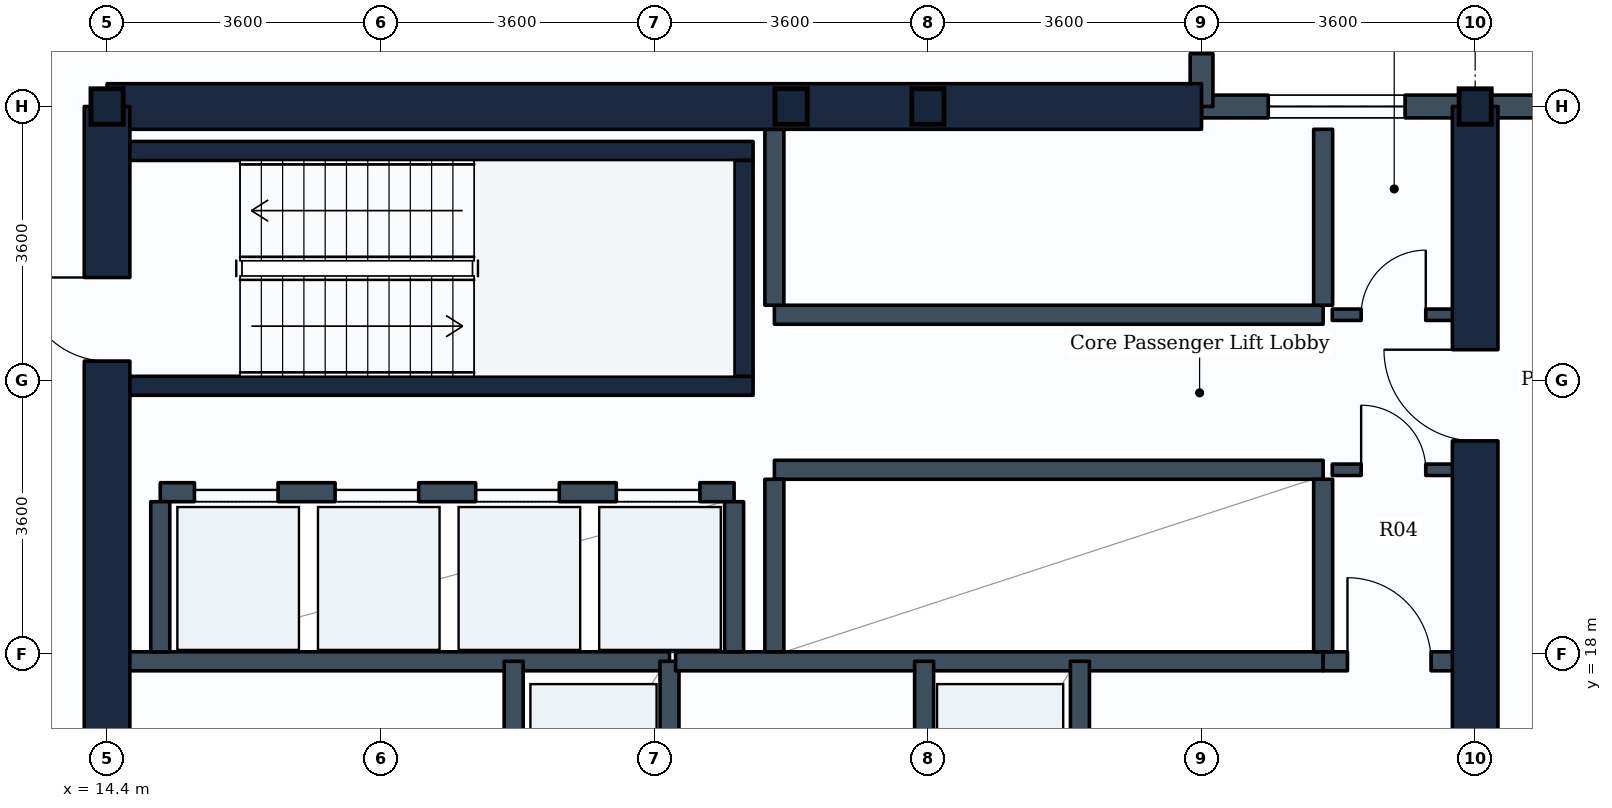
"""IFC4 building model, lengths in metres.
Left out: names, types, materials, properties, quantities, classifications, styles, units other than length and angle.
Written with IfcOpenShell. Run it as: python <this file> out.ifc"""

import sys

from ifc_helpers import new_model, si_unit, direction, frame, frame_2d, origin, origin_2d, place, context, subcontext, project, spatial, rectangle, i_section, extrude, element, fill, save


model = new_model("IFC4")
c1 = context("Model", 3, precision=1e-05, world=origin(), true_north=direction((0.0, 1.0)))
c2 = subcontext(c1, "Body", "Model", "MODEL_VIEW")
j1 = project(units=[si_unit("LENGTHUNIT", "METRE"), si_unit("PLANEANGLEUNIT", "RADIAN")], contexts=[c1])
p1 = place(None, origin())
s1 = spatial("IfcSite", under=j1, at=p1, CompositionType="ELEMENT")
p2 = place(p1, origin())
s2 = spatial("IfcBuilding", under=s1, at=p2, CompositionType="ELEMENT")
p3 = place(p2, frame((0.0, 0.0, 39.6)))
s3 = spatial("IfcBuildingStorey", under=s2, at=p3, CompositionType="ELEMENT", Elevation=39.6)
for number, where, z_axis, x_axis in (
    (1, (14.4, 25.2, 0.0), (0.0, 0.0, 1.0), (1.0, 0.0, 0.0)),
    (2, (23.4, 25.2, 0.0), (0.0, 0.0, 1.0), (1.0, 0.0, 0.0)),
    (3, (25.2, 25.2, 0.0), (0.0, 0.0, 1.0), (1.0, 0.0, 0.0)),
    (4, (32.4, 25.2, 0.0), (0.0, 0.0, 1.0), (1.0, 0.0, 0.0)),
):
    element("IfcColumn", number, at=place(p3, frame(where, z_axis=z_axis, x_axis=x_axis)), inside=s3, PredefinedType="COLUMN", context=c2, shape_type="SweptSolid", body=[
        extrude(i_section(OverallWidth=0.424, OverallDepth=0.467, WebThickness=0.033, FlangeThickness=0.053, FilletRadius=0.015, at=origin_2d()), origin(), (0.0, 0.0, 1.0), 3.9),
    ])
p4 = place(p3, frame((32.4, 25.2, 0.0), z_axis=(0.0, 0.0, 1.0), x_axis=(1.0, 0.0, 0.0)))
e5 = element("IfcWall", 5, at=p4, inside=s3, PredefinedType="STANDARD", context=c2, shape_type="SweptSolid", body=[
    extrude(rectangle(XDim=3.6, YDim=0.3, at=frame_2d((1.8, 0.0))), origin(), (0.0, 0.0, 1.0), 2.93),
])
p5 = place(p3, frame((28.8, 25.2, 0.0), z_axis=(0.0, 0.0, 1.0), x_axis=(1.0, 0.0, 0.0)))
e6 = element("IfcWall", 6, at=p5, inside=s3, PredefinedType="STANDARD", context=c2, shape_type="SweptSolid", body=[
    extrude(rectangle(XDim=3.6, YDim=0.3, at=frame_2d((1.8, 0.0))), origin(), (0.0, 0.0, 1.0), 3.635),
])
p6 = place(p5, frame((0.878, 0.0, 0.85)))
e7 = element("IfcOpeningElement", 7, at=p6, cuts=e6, PredefinedType="OPENING", context=c2, shape_type="SweptSolid", body=[
    extrude(rectangle(XDim=1.8, YDim=1.35, at=frame_2d((0.9, 0.675))), frame((0.0, 0.16, 0.0), z_axis=(0.0, -1.0, 0.0), x_axis=(1.0, 0.0, 0.0)), (0.0, 0.0, 1.0), 0.32),
])
p7 = place(p3, frame((28.8, 25.2, 0.0), z_axis=(0.0, 0.0, 1.0), x_axis=(0.0, 1.0, 0.0)))
e8 = element("IfcWall", 8, at=p7, inside=s3, PredefinedType="STANDARD", context=c2, shape_type="SweptSolid", body=[
    extrude(rectangle(XDim=3.6, YDim=0.3, at=frame_2d((1.8, 0.0))), origin(), (0.0, 0.0, 1.0), 3.14),
])
p8 = place(p7, frame((0.695, 0.0, 0.85)))
e9 = element("IfcOpeningElement", 9, at=p8, cuts=e8, PredefinedType="OPENING", context=c2, shape_type="SweptSolid", body=[
    extrude(rectangle(XDim=1.8, YDim=1.35, at=frame_2d((0.9, 0.675))), frame((0.0, 0.16, 0.0), z_axis=(0.0, -1.0, 0.0), x_axis=(1.0, 0.0, 0.0)), (0.0, 0.0, 1.0), 0.32),
])
p9 = place(p3, frame((14.4, 25.2, 0.0), z_axis=(0.0, 0.0, 1.0), x_axis=(1.0, 0.0, 0.0)))
e10 = element("IfcWall", 10, at=p9, inside=s3, PredefinedType="SHEAR", context=c2, shape_type="SweptSolid", body=[
    extrude(rectangle(XDim=14.4, YDim=0.6, at=frame_2d((7.2, 0.0))), origin(), (0.0, 0.0, 1.0), 3.65),
])
p10 = place(p3, frame((14.4, 10.8, 0.0), z_axis=(0.0, 0.0, 1.0), x_axis=(0.0, 1.0, 0.0)))
e11 = element("IfcWall", 11, at=p10, inside=s3, PredefinedType="SHEAR", context=c2, shape_type="SweptSolid", body=[
    extrude(rectangle(XDim=14.4, YDim=0.6, at=frame_2d((7.2, 0.0))), origin(), (0.0, 0.0, 1.0), 3.65),
])
p11 = place(p10, frame((11.05, 0.0, 0.0)))
e12 = element("IfcOpeningElement", 12, at=p11, cuts=e11, PredefinedType="OPENING", context=c2, shape_type="SweptSolid", body=[
    extrude(rectangle(XDim=1.1, YDim=2.1, at=frame_2d((0.55, 1.05))), frame((0.0, 0.31, 0.0), z_axis=(0.0, -1.0, 0.0), x_axis=(1.0, 0.0, 0.0)), (0.0, 0.0, 1.0), 0.62),
])
p12 = place(p10, frame((4.9, 0.0, 0.0)))
e13 = element("IfcOpeningElement", 13, at=p12, cuts=e11, PredefinedType="OPENING", context=c2, shape_type="SweptSolid", body=[
    extrude(rectangle(XDim=1.2, YDim=2.1, at=frame_2d((0.6, 1.05))), frame((0.0, 0.31, 0.0), z_axis=(0.0, -1.0, 0.0), x_axis=(1.0, 0.0, 0.0)), (0.0, 0.0, 1.0), 0.62),
])
p13 = place(p3, frame((32.4, 10.8, 0.0), z_axis=(0.0, 0.0, 1.0), x_axis=(0.0, 1.0, 0.0)))
e14 = element("IfcWall", 14, at=p13, inside=s3, PredefinedType="SHEAR", context=c2, shape_type="SweptSolid", body=[
    extrude(rectangle(XDim=14.4, YDim=0.6, at=frame_2d((7.2, 0.0))), origin(), (0.0, 0.0, 1.0), 3.65),
])
p14 = place(p13, frame((4.35, 0.0, 0.0)))
e15 = element("IfcOpeningElement", 15, at=p14, cuts=e14, PredefinedType="OPENING", context=c2, shape_type="SweptSolid", body=[
    extrude(rectangle(XDim=1.2, YDim=2.1, at=frame_2d((0.6, 1.05))), frame((0.0, 0.31, 0.0), z_axis=(0.0, -1.0, 0.0), x_axis=(1.0, 0.0, 0.0)), (0.0, 0.0, 1.0), 0.62),
])
p15 = place(p13, frame((10.0, 0.0, 0.0)))
e16 = element("IfcOpeningElement", 16, at=p15, cuts=e14, PredefinedType="OPENING", context=c2, shape_type="SweptSolid", body=[
    extrude(rectangle(XDim=1.2, YDim=2.1, at=frame_2d((0.6, 1.05))), frame((0.0, 0.31, 0.0), z_axis=(0.0, -1.0, 0.0), x_axis=(1.0, 0.0, 0.0)), (0.0, 0.0, 1.0), 0.62),
])
for number, where, z_axis, x_axis in (
    (17, (14.7, 21.525, 0.0), (0.0, 0.0, 1.0), (1.0, 0.0, 0.0)),
    (18, (14.7, 24.615, 0.0), (0.0, 0.0, 1.0), (1.0, 0.0, 0.0)),
):
    element("IfcWall", number, at=place(p3, frame(where, z_axis=z_axis, x_axis=x_axis)), inside=s3, PredefinedType="SHEAR", context=c2, shape_type="SweptSolid", body=[
        extrude(rectangle(XDim=8.2, YDim=0.25, at=frame_2d((4.1, 0.0))), origin(), (0.0, 0.0, 1.0), 3.65),
    ])
p16 = place(p3, frame((22.775, 21.65, 0.0), z_axis=(0.0, 0.0, 1.0), x_axis=(0.0, 1.0, 0.0)))
e19 = element("IfcWall", 19, at=p16, inside=s3, PredefinedType="SHEAR", context=c2, shape_type="SweptSolid", body=[
    extrude(rectangle(XDim=2.84, YDim=0.25, at=frame_2d((1.42, 0.0))), origin(), (0.0, 0.0, 1.0), 3.65),
])
p17 = place(p3, frame((14.65, 17.9, 0.0), z_axis=(0.0, 0.0, 1.0), x_axis=(1.0, 0.0, 0.0)))
e20 = element("IfcWall", 20, at=p17, inside=s3, PredefinedType="PARTITIONING", context=c2, shape_type="SweptSolid", body=[
    extrude(rectangle(XDim=7.15, YDim=0.25, at=frame_2d((3.575, 0.0))), origin(), (0.0, 0.0, 1.0), 3.635),
])
p18 = place(p3, frame((19.75, 14.84, 0.0), z_axis=(0.0, 0.0, 1.0), x_axis=(0.0, 1.0, 0.0)))
e21 = element("IfcWall", 21, at=p18, inside=s3, PredefinedType="PARTITIONING", context=c2, shape_type="SweptSolid", body=[
    extrude(rectangle(XDim=3.06, YDim=0.25, at=frame_2d((1.53, 0.0))), origin(), (0.0, 0.0, 1.0), 3.635),
])
p19 = place(p18, frame((0.98, 0.0, 0.0)))
e22 = element("IfcOpeningElement", 22, at=p19, cuts=e21, PredefinedType="OPENING", context=c2, shape_type="SweptSolid", body=[
    extrude(rectangle(XDim=1.1, YDim=2.1, at=frame_2d((0.55, 1.05))), frame((0.0, 0.135, 0.0), z_axis=(0.0, -1.0, 0.0), x_axis=(1.0, 0.0, 0.0)), (0.0, 0.0, 1.0), 0.27),
])
p20 = place(p3, frame((21.8, 14.84, 0.0), z_axis=(0.0, 0.0, 1.0), x_axis=(0.0, 1.0, 0.0)))
e23 = element("IfcWall", 23, at=p20, inside=s3, PredefinedType="PARTITIONING", context=c2, shape_type="SweptSolid", body=[
    extrude(rectangle(XDim=3.06, YDim=0.25, at=frame_2d((1.53, 0.0))), origin(), (0.0, 0.0, 1.0), 3.635),
])
p21 = place(p3, frame((21.88, 17.9, 0.0), z_axis=(0.0, 0.0, 1.0), x_axis=(1.0, 0.0, 0.0)))
e24 = element("IfcWall", 24, at=p21, inside=s3, PredefinedType="PARTITIONING", context=c2, shape_type="SweptSolid", body=[
    extrude(rectangle(XDim=8.52, YDim=0.25, at=frame_2d((4.26, 0.0))), origin(), (0.0, 0.0, 1.0), 3.635),
])
p22 = place(p3, frame((30.4, 17.9, 0.0), z_axis=(0.0, 0.0, 1.0), x_axis=(1.0, 0.0, 0.0)))
e25 = element("IfcWall", 25, at=p22, inside=s3, PredefinedType="PARTITIONING", context=c2, shape_type="SweptSolid", body=[
    extrude(rectangle(XDim=1.75, YDim=0.25, at=frame_2d((0.875, 0.0))), origin(), (0.0, 0.0, 1.0), 3.635),
])
p23 = place(p22, frame((0.32, 0.0, 0.0)))
e26 = element("IfcOpeningElement", 26, at=p23, cuts=e25, PredefinedType="OPENING", context=c2, shape_type="SweptSolid", body=[
    extrude(rectangle(XDim=1.1, YDim=2.1, at=frame_2d((0.55, 1.05))), frame((0.0, 0.135, 0.0), z_axis=(0.0, -1.0, 0.0), x_axis=(1.0, 0.0, 0.0)), (0.0, 0.0, 1.0), 0.27),
])
p24 = place(p3, frame((25.15, 14.84, 0.0), z_axis=(0.0, 0.0, 1.0), x_axis=(0.0, 1.0, 0.0)))
e27 = element("IfcWall", 27, at=p24, inside=s3, PredefinedType="PARTITIONING", context=c2, shape_type="SweptSolid", body=[
    extrude(rectangle(XDim=3.06, YDim=0.25, at=frame_2d((1.53, 0.0))), origin(), (0.0, 0.0, 1.0), 3.635),
])
p25 = place(p3, frame((27.2, 14.84, 0.0), z_axis=(0.0, 0.0, 1.0), x_axis=(0.0, 1.0, 0.0)))
e28 = element("IfcWall", 28, at=p25, inside=s3, PredefinedType="PARTITIONING", context=c2, shape_type="SweptSolid", body=[
    extrude(rectangle(XDim=3.06, YDim=0.25, at=frame_2d((1.53, 0.0))), origin(), (0.0, 0.0, 1.0), 3.635),
])
p26 = place(p25, frame((0.98, 0.0, 0.0)))
e29 = element("IfcOpeningElement", 29, at=p26, cuts=e28, PredefinedType="OPENING", context=c2, shape_type="SweptSolid", body=[
    extrude(rectangle(XDim=1.1, YDim=2.1, at=frame_2d((0.55, 1.05))), frame((0.0, 0.135, 0.0), z_axis=(0.0, -1.0, 0.0), x_axis=(1.0, 0.0, 0.0)), (0.0, 0.0, 1.0), 0.27),
])
p27 = place(p3, frame((15.1, 20.125, 0.0), z_axis=(0.0, 0.0, 1.0), x_axis=(1.0, 0.0, 0.0)))
e30 = element("IfcWall", 30, at=p27, inside=s3, PredefinedType="PARTITIONING", context=c2, shape_type="SweptSolid", body=[
    extrude(rectangle(XDim=7.55, YDim=0.25, at=frame_2d((3.775, 0.0))), origin(), (0.0, 0.0, 1.0), 3.635),
])
p28 = place(p27, frame((0.45, 0.0, 0.0)))
e31 = element("IfcOpeningElement", 31, at=p28, cuts=e30, PredefinedType="OPENING", context=c2, shape_type="SweptSolid", body=[
    extrude(rectangle(XDim=1.1, YDim=2.1, at=frame_2d((0.55, 1.05))), frame((0.0, 0.135, 0.0), z_axis=(0.0, -1.0, 0.0), x_axis=(1.0, 0.0, 0.0)), (0.0, 0.0, 1.0), 0.27),
])
p29 = place(p27, frame((2.3, 0.0, 0.0)))
e32 = element("IfcOpeningElement", 32, at=p29, cuts=e30, PredefinedType="OPENING", context=c2, shape_type="SweptSolid", body=[
    extrude(rectangle(XDim=1.1, YDim=2.1, at=frame_2d((0.55, 1.05))), frame((0.0, 0.135, 0.0), z_axis=(0.0, -1.0, 0.0), x_axis=(1.0, 0.0, 0.0)), (0.0, 0.0, 1.0), 0.27),
])
p30 = place(p27, frame((4.15, 0.0, 0.0)))
e33 = element("IfcOpeningElement", 33, at=p30, cuts=e30, PredefinedType="OPENING", context=c2, shape_type="SweptSolid", body=[
    extrude(rectangle(XDim=1.1, YDim=2.1, at=frame_2d((0.55, 1.05))), frame((0.0, 0.135, 0.0), z_axis=(0.0, -1.0, 0.0), x_axis=(1.0, 0.0, 0.0)), (0.0, 0.0, 1.0), 0.27),
])
p31 = place(p27, frame((6.0, 0.0, 0.0)))
e34 = element("IfcOpeningElement", 34, at=p31, cuts=e30, PredefinedType="OPENING", context=c2, shape_type="SweptSolid", body=[
    extrude(rectangle(XDim=1.1, YDim=2.1, at=frame_2d((0.55, 1.05))), frame((0.0, 0.135, 0.0), z_axis=(0.0, -1.0, 0.0), x_axis=(1.0, 0.0, 0.0)), (0.0, 0.0, 1.0), 0.27),
])
for number, where, z_axis, x_axis in (
    (35, (15.1, 18.025, 0.0), (0.0, 0.0, 1.0), (0.0, 1.0, 0.0)),
    (36, (22.65, 18.025, 0.0), (0.0, 0.0, 1.0), (0.0, 1.0, 0.0)),
):
    element("IfcWall", number, at=place(p3, frame(where, z_axis=z_axis, x_axis=x_axis)), inside=s3, PredefinedType="PARTITIONING", context=c2, shape_type="SweptSolid", body=[
        extrude(rectangle(XDim=1.975, YDim=0.25, at=frame_2d((0.988, 0.0))), origin(), (0.0, 0.0, 1.0), 3.635),
    ])
p32 = place(p3, frame((23.18, 20.42, 0.0), z_axis=(0.0, 0.0, 1.0), x_axis=(1.0, 0.0, 0.0)))
e37 = element("IfcWall", 37, at=p32, inside=s3, PredefinedType="PARTITIONING", context=c2, shape_type="SweptSolid", body=[
    extrude(rectangle(XDim=7.22, YDim=0.25, at=frame_2d((3.61, 0.0))), origin(), (0.0, 0.0, 1.0), 3.635),
])
for number, where, z_axis, x_axis in (
    (38, (23.18, 18.025, 0.0), (0.0, 0.0, 1.0), (0.0, 1.0, 0.0)),
    (39, (30.4, 18.025, 0.0), (0.0, 0.0, 1.0), (0.0, 1.0, 0.0)),
):
    element("IfcWall", number, at=place(p3, frame(where, z_axis=z_axis, x_axis=x_axis)), inside=s3, PredefinedType="PARTITIONING", context=c2, shape_type="SweptSolid", body=[
        extrude(rectangle(XDim=2.27, YDim=0.25, at=frame_2d((1.135, 0.0))), origin(), (0.0, 0.0, 1.0), 3.635),
    ])
p33 = place(p3, frame((23.18, 22.46, 0.0), z_axis=(0.0, 0.0, 1.0), x_axis=(1.0, 0.0, 0.0)))
e40 = element("IfcWall", 40, at=p33, inside=s3, PredefinedType="PARTITIONING", context=c2, shape_type="SweptSolid", body=[
    extrude(rectangle(XDim=7.22, YDim=0.25, at=frame_2d((3.61, 0.0))), origin(), (0.0, 0.0, 1.0), 3.635),
])
for number, where, z_axis, x_axis in (
    (41, (23.18, 22.585, 0.0), (0.0, 0.0, 1.0), (0.0, 1.0, 0.0)),
    (42, (30.4, 22.585, 0.0), (0.0, 0.0, 1.0), (0.0, 1.0, 0.0)),
):
    element("IfcWall", number, at=place(p3, frame(where, z_axis=z_axis, x_axis=x_axis)), inside=s3, PredefinedType="PARTITIONING", context=c2, shape_type="SweptSolid", body=[
        extrude(rectangle(XDim=2.315, YDim=0.25, at=frame_2d((1.157, 0.0))), origin(), (0.0, 0.0, 1.0), 3.635),
    ])
p34 = place(p3, frame((30.52, 22.46, 0.0), z_axis=(0.0, 0.0, 1.0), x_axis=(1.0, 0.0, 0.0)))
e43 = element("IfcWall", 43, at=p34, inside=s3, PredefinedType="PARTITIONING", context=c2, shape_type="SweptSolid", body=[
    extrude(rectangle(XDim=1.63, YDim=0.15, at=frame_2d((0.815, 0.0))), origin(), (0.0, 0.0, 1.0), 3.635),
])
p35 = place(p34, frame((0.38, 0.0, 0.0)))
e44 = element("IfcOpeningElement", 44, at=p35, cuts=e43, PredefinedType="OPENING", context=c2, shape_type="SweptSolid", body=[
    extrude(rectangle(XDim=0.85, YDim=2.1, at=frame_2d((0.425, 1.05))), frame((0.0, 0.085, 0.0), z_axis=(0.0, -1.0, 0.0), x_axis=(1.0, 0.0, 0.0)), (0.0, 0.0, 1.0), 0.17),
])
p36 = place(p3, frame((30.52, 20.42, 0.0), z_axis=(0.0, 0.0, 1.0), x_axis=(1.0, 0.0, 0.0)))
e45 = element("IfcWall", 45, at=p36, inside=s3, PredefinedType="PARTITIONING", context=c2, shape_type="SweptSolid", body=[
    extrude(rectangle(XDim=1.63, YDim=0.15, at=frame_2d((0.815, 0.0))), origin(), (0.0, 0.0, 1.0), 3.635),
])
p37 = place(p36, frame((0.38, 0.0, 0.0)))
e46 = element("IfcOpeningElement", 46, at=p37, cuts=e45, PredefinedType="OPENING", context=c2, shape_type="SweptSolid", body=[
    extrude(rectangle(XDim=0.85, YDim=2.1, at=frame_2d((0.425, 1.05))), frame((0.0, 0.085, 0.0), z_axis=(0.0, -1.0, 0.0), x_axis=(1.0, 0.0, 0.0)), (0.0, 0.0, 1.0), 0.17),
])
p38 = place(p6, origin())
e47 = element("IfcWindow", 47, at=p38, inside=s3, PartitioningType="SINGLE_PANEL", PredefinedType="WINDOW", context=c2, shape_type="SweptSolid", body=[
    extrude(rectangle(XDim=1.8, YDim=1.35, at=frame_2d((0.9, 0.675))), frame((0.0, 0.03, 0.0), z_axis=(0.0, -1.0, 0.0), x_axis=(1.0, 0.0, 0.0)), (0.0, 0.0, 1.0), 0.06),
])
fill(e7, e47)
p39 = place(p8, origin())
e48 = element("IfcWindow", 48, at=p39, inside=s3, PartitioningType="SINGLE_PANEL", PredefinedType="WINDOW", context=c2, shape_type="SweptSolid", body=[
    extrude(rectangle(XDim=1.8, YDim=1.35, at=frame_2d((0.9, 0.675))), frame((0.0, 0.03, 0.0), z_axis=(0.0, -1.0, 0.0), x_axis=(1.0, 0.0, 0.0)), (0.0, 0.0, 1.0), 0.06),
])
fill(e9, e48)
p40 = place(p11, origin())
e49 = element("IfcDoor", 49, at=p40, inside=s3, OperationType="SINGLE_SWING_RIGHT", PredefinedType="DOOR", context=c2, shape_type="SweptSolid", body=[
    extrude(rectangle(XDim=1.1, YDim=2.1, at=frame_2d((0.55, 1.05))), frame((0.0, 0.025, 0.0), z_axis=(0.0, -1.0, 0.0), x_axis=(1.0, 0.0, 0.0)), (0.0, 0.0, 1.0), 0.05),
])
fill(e12, e49)
p41 = place(p23, origin())
e50 = element("IfcDoor", 50, at=p41, inside=s3, OperationType="SINGLE_SWING_LEFT", PredefinedType="DOOR", context=c2, shape_type="SweptSolid", body=[
    extrude(rectangle(XDim=1.1, YDim=2.1, at=frame_2d((0.55, 1.05))), frame((0.0, 0.025, 0.0), z_axis=(0.0, -1.0, 0.0), x_axis=(1.0, 0.0, 0.0)), (0.0, 0.0, 1.0), 0.05),
])
fill(e26, e50)
p42 = place(p28, origin())
e51 = element("IfcDoor", 51, at=p42, inside=s3, OperationType="SLIDING_TO_LEFT", PredefinedType="DOOR", context=c2, shape_type="SweptSolid", body=[
    extrude(rectangle(XDim=1.1, YDim=2.1, at=frame_2d((0.55, 1.05))), frame((0.0, 0.025, 0.0), z_axis=(0.0, -1.0, 0.0), x_axis=(1.0, 0.0, 0.0)), (0.0, 0.0, 1.0), 0.05),
])
fill(e31, e51)
p43 = place(p29, origin())
e52 = element("IfcDoor", 52, at=p43, inside=s3, OperationType="SLIDING_TO_LEFT", PredefinedType="DOOR", context=c2, shape_type="SweptSolid", body=[
    extrude(rectangle(XDim=1.1, YDim=2.1, at=frame_2d((0.55, 1.05))), frame((0.0, 0.025, 0.0), z_axis=(0.0, -1.0, 0.0), x_axis=(1.0, 0.0, 0.0)), (0.0, 0.0, 1.0), 0.05),
])
fill(e32, e52)
p44 = place(p30, origin())
e53 = element("IfcDoor", 53, at=p44, inside=s3, OperationType="SLIDING_TO_LEFT", PredefinedType="DOOR", context=c2, shape_type="SweptSolid", body=[
    extrude(rectangle(XDim=1.1, YDim=2.1, at=frame_2d((0.55, 1.05))), frame((0.0, 0.025, 0.0), z_axis=(0.0, -1.0, 0.0), x_axis=(1.0, 0.0, 0.0)), (0.0, 0.0, 1.0), 0.05),
])
fill(e33, e53)
p45 = place(p31, origin())
e54 = element("IfcDoor", 54, at=p45, inside=s3, OperationType="SLIDING_TO_LEFT", PredefinedType="DOOR", context=c2, shape_type="SweptSolid", body=[
    extrude(rectangle(XDim=1.1, YDim=2.1, at=frame_2d((0.55, 1.05))), frame((0.0, 0.025, 0.0), z_axis=(0.0, -1.0, 0.0), x_axis=(1.0, 0.0, 0.0)), (0.0, 0.0, 1.0), 0.05),
])
fill(e34, e54)
p46 = place(p15, origin())
e55 = element("IfcDoor", 55, at=p46, inside=s3, OperationType="SINGLE_SWING_RIGHT", PredefinedType="DOOR", context=c2, shape_type="SweptSolid", body=[
    extrude(rectangle(XDim=1.2, YDim=2.1, at=frame_2d((0.6, 1.05))), frame((0.0, 0.025, 0.0), z_axis=(0.0, -1.0, 0.0), x_axis=(1.0, 0.0, 0.0)), (0.0, 0.0, 1.0), 0.05),
])
fill(e16, e55)
p47 = place(p35, origin())
e56 = element("IfcDoor", 56, at=p47, inside=s3, OperationType="SINGLE_SWING_RIGHT", PredefinedType="DOOR", context=c2, shape_type="SweptSolid", body=[
    extrude(rectangle(XDim=0.85, YDim=2.1, at=frame_2d((0.425, 1.05))), frame((0.0, 0.025, 0.0), z_axis=(0.0, -1.0, 0.0), x_axis=(1.0, 0.0, 0.0)), (0.0, 0.0, 1.0), 0.05),
])
fill(e44, e56)
p48 = place(p37, origin())
e57 = element("IfcDoor", 57, at=p48, inside=s3, OperationType="SINGLE_SWING_LEFT", PredefinedType="DOOR", context=c2, shape_type="SweptSolid", body=[
    extrude(rectangle(XDim=0.85, YDim=2.1, at=frame_2d((0.425, 1.05))), frame((0.0, 0.025, 0.0), z_axis=(0.0, -1.0, 0.0), x_axis=(1.0, 0.0, 0.0)), (0.0, 0.0, 1.0), 0.05),
])
fill(e46, e57)
save(model, sys.argv[1])
